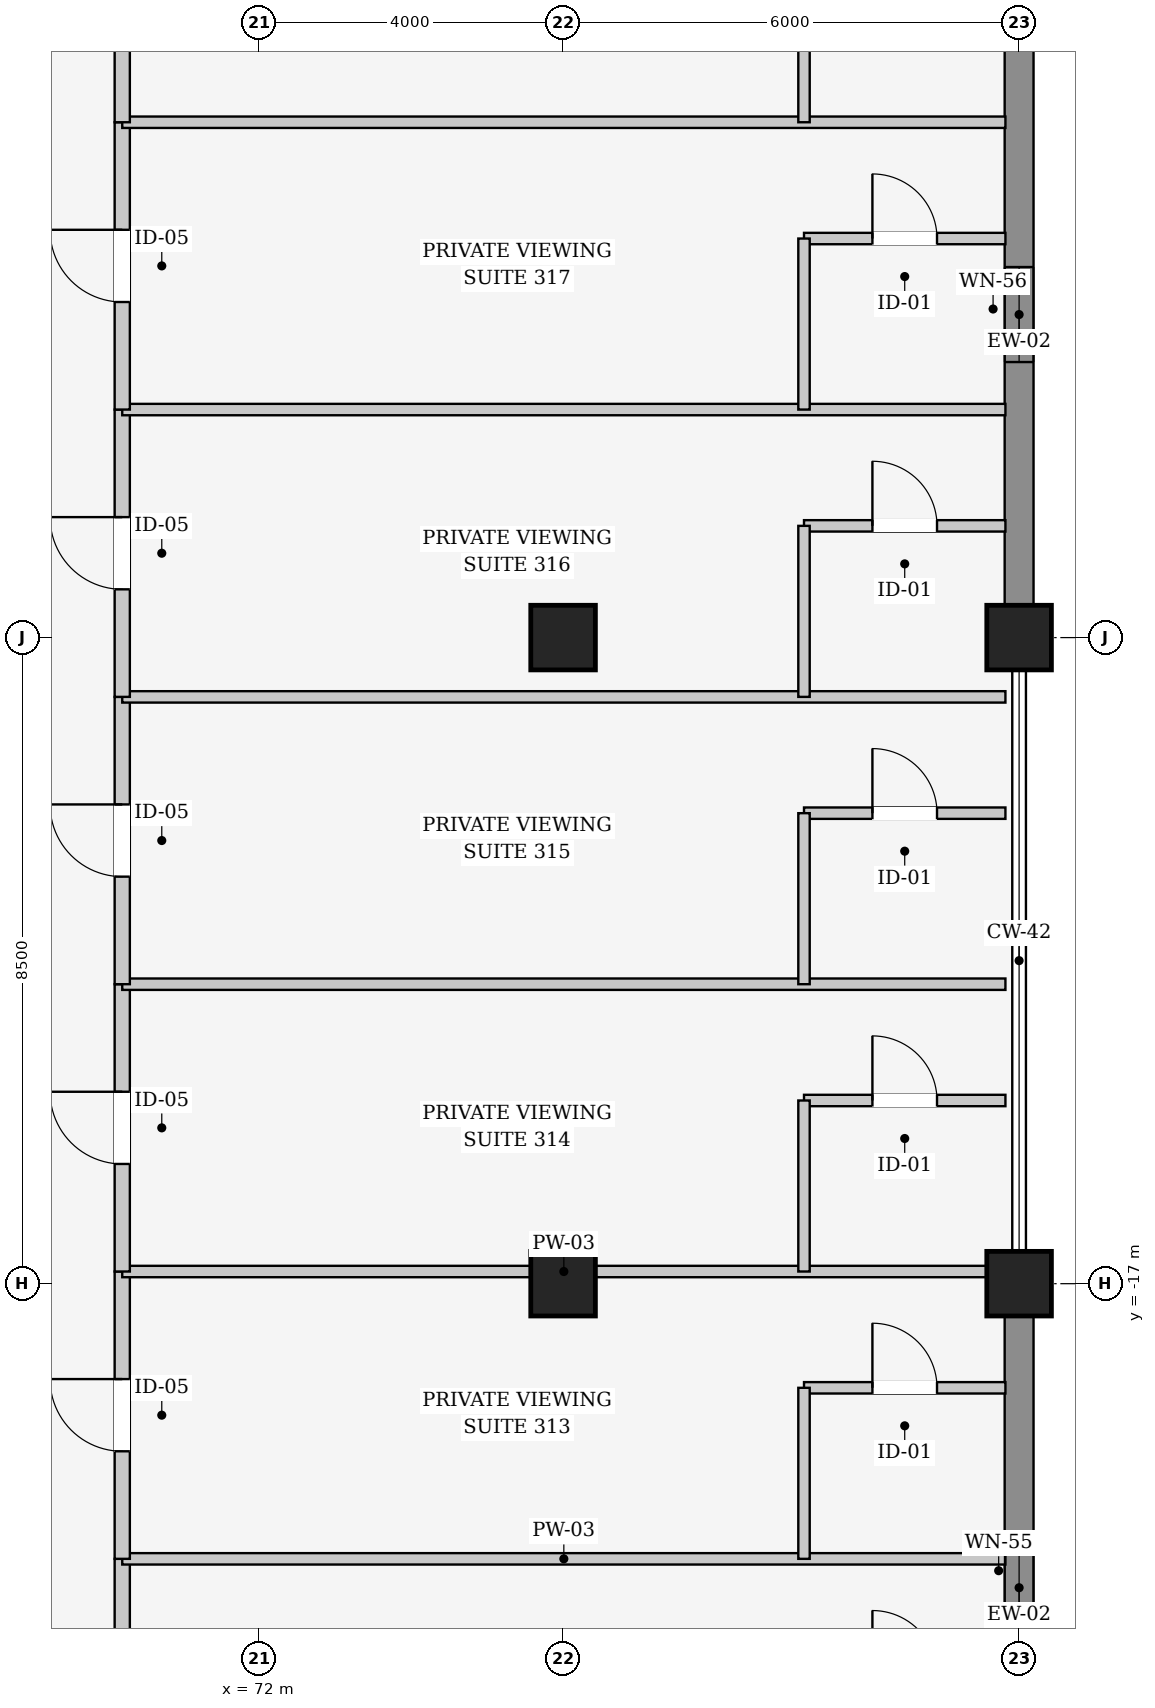
"""IFC4 building model, lengths in metres.
Left out: names, types, materials, properties, quantities, classifications, styles, units other than length and angle.
Written with IfcOpenShell. Run it as: python <this file> out.ifc"""

import sys

from ifc_helpers import new_model, si_unit, direction, frame, frame_2d, origin, origin_2d, place, context, subcontext, project, spatial, rectangle, extrude, element, fill, save


model = new_model("IFC4")
c1 = context("Model", 3, precision=1e-05, world=origin(), true_north=direction((0.0, 1.0)))
c2 = subcontext(c1, "Body", "Model", "MODEL_VIEW")
j1 = project(units=[si_unit("LENGTHUNIT", "METRE"), si_unit("PLANEANGLEUNIT", "RADIAN")], contexts=[c1])
p1 = place(None, origin())
s1 = spatial("IfcSite", under=j1, at=p1, CompositionType="ELEMENT")
p2 = place(p1, origin())
s2 = spatial("IfcBuilding", under=s1, at=p2, CompositionType="ELEMENT")
p3 = place(p2, frame((0.0, 0.0, 16.2)))
s3 = spatial("IfcBuildingStorey", under=s2, at=p3, CompositionType="ELEMENT", Elevation=16.2)
for number, where, z_axis, x_axis in (
    (1, (76.0, -17.0, 0.0), (0.0, 0.0, 1.0), (1.0, 0.0, 0.0)),
    (2, (76.0, -8.5, 0.0), (0.0, 0.0, 1.0), (1.0, 0.0, 0.0)),
    (3, (82.0, -17.0, 0.0), (0.0, 0.0, 1.0), (1.0, 0.0, 0.0)),
    (4, (82.0, -8.5, 0.0), (0.0, 0.0, 1.0), (1.0, 0.0, 0.0)),
):
    element("IfcColumn", number, at=place(p3, frame(where, z_axis=z_axis, x_axis=x_axis)), inside=s3, PredefinedType="COLUMN", context=c2, shape_type="SweptSolid", body=[
        extrude(rectangle(XDim=0.85, YDim=0.85, at=origin_2d()), origin(), (0.0, 0.0, 1.0), 4.8),
    ])
p4 = place(p3, frame((82.0, -17.407, 0.0), z_axis=(0.0, 0.0, 1.0), x_axis=(0.0, -1.0, 0.0)))
e5 = element("IfcWall", 5, at=p4, inside=s3, PredefinedType="SOLIDWALL", context=c2, shape_type="SweptSolid", body=[
    extrude(rectangle(XDim=7.186, YDim=0.38, at=frame_2d((3.593, 0.0))), origin(), (0.0, 0.0, 1.0), 3.76),
])
p5 = place(p4, frame((3.068, 0.0, 0.9)))
e6 = element("IfcOpeningElement", 6, at=p5, cuts=e5, PredefinedType="OPENING", context=c2, shape_type="SweptSolid", body=[
    extrude(rectangle(XDim=1.05, YDim=2.8, at=frame_2d((0.525, 1.4))), frame((0.0, 0.2, 0.0), z_axis=(0.0, -1.0, 0.0), x_axis=(1.0, 0.0, 0.0)), (0.0, 0.0, 1.0), 0.4),
])
p6 = place(p3, frame((82.0, -0.407, 0.0), z_axis=(0.0, 0.0, 1.0), x_axis=(0.0, -1.0, 0.0)))
e7 = element("IfcWall", 7, at=p6, inside=s3, PredefinedType="SOLIDWALL", context=c2, shape_type="SweptSolid", body=[
    extrude(rectangle(XDim=7.686, YDim=0.38, at=frame_2d((3.843, 0.0))), origin(), (0.0, 0.0, 1.0), 3.76),
])
p7 = place(p6, frame((3.218, 0.0, 0.9)))
e8 = element("IfcOpeningElement", 8, at=p7, cuts=e7, PredefinedType="OPENING", context=c2, shape_type="SweptSolid", body=[
    extrude(rectangle(XDim=1.25, YDim=2.8, at=frame_2d((0.625, 1.4))), frame((0.0, 0.2, 0.0), z_axis=(0.0, -1.0, 0.0), x_axis=(1.0, 0.0, 0.0)), (0.0, 0.0, 1.0), 0.4),
])
p8 = place(p3, frame((70.2, -24.4, 0.0), z_axis=(0.0, 0.0, 1.0), x_axis=(0.0, 1.0, 0.0)))
e9 = element("IfcWall", 9, at=p8, inside=s3, PredefinedType="PARTITIONING", context=c2, shape_type="SweptSolid", body=[
    extrude(rectangle(XDim=3.78, YDim=0.2, at=frame_2d((1.89, 0.0))), origin(), (0.0, 0.0, 1.0), 4.182),
])
p9 = place(p8, frame((1.415, 0.0, 0.0)))
e10 = element("IfcOpeningElement", 10, at=p9, cuts=e9, PredefinedType="OPENING", context=c2, shape_type="SweptSolid", body=[
    extrude(rectangle(XDim=0.95, YDim=2.25, at=frame_2d((0.475, 1.125))), frame((0.0, 0.11, 0.0), z_axis=(0.0, -1.0, 0.0), x_axis=(1.0, 0.0, 0.0)), (0.0, 0.0, 1.0), 0.22),
])
p10 = place(p3, frame((70.2, -20.62, 0.0), z_axis=(0.0, 0.0, 1.0), x_axis=(1.0, 0.0, 0.0)))
e11 = element("IfcWall", 11, at=p10, inside=s3, PredefinedType="PARTITIONING", context=c2, shape_type="SweptSolid", body=[
    extrude(rectangle(XDim=11.62, YDim=0.15, at=frame_2d((5.81, 0.0))), origin(), (0.0, 0.0, 1.0), 3.845),
])
p11 = place(p3, frame((79.17, -18.37, 0.0), z_axis=(0.0, 0.0, 1.0), x_axis=(1.0, 0.0, 0.0)))
e12 = element("IfcWall", 12, at=p11, inside=s3, PredefinedType="PARTITIONING", context=c2, shape_type="SweptSolid", body=[
    extrude(rectangle(XDim=2.65, YDim=0.15, at=frame_2d((1.325, 0.0))), origin(), (0.0, 0.0, 1.0), 3.845),
])
p12 = place(p11, frame((0.9, 0.0, 0.0)))
e13 = element("IfcOpeningElement", 13, at=p12, cuts=e12, PredefinedType="OPENING", context=c2, shape_type="SweptSolid", body=[
    extrude(rectangle(XDim=0.85, YDim=2.15, at=frame_2d((0.425, 1.075))), frame((0.0, 0.085, 0.0), z_axis=(0.0, -1.0, 0.0), x_axis=(1.0, 0.0, 0.0)), (0.0, 0.0, 1.0), 0.17),
])
p13 = place(p3, frame((79.17, -20.62, 0.0), z_axis=(0.0, 0.0, 1.0), x_axis=(0.0, 1.0, 0.0)))
e14 = element("IfcWall", 14, at=p13, inside=s3, PredefinedType="PARTITIONING", context=c2, shape_type="SweptSolid", body=[
    extrude(rectangle(XDim=2.25, YDim=0.15, at=frame_2d((1.125, 0.0))), origin(), (0.0, 0.0, 1.0), 4.44),
])
p14 = place(p3, frame((70.2, -20.62, 0.0), z_axis=(0.0, 0.0, 1.0), x_axis=(0.0, 1.0, 0.0)))
e15 = element("IfcWall", 15, at=p14, inside=s3, PredefinedType="PARTITIONING", context=c2, shape_type="SweptSolid", body=[
    extrude(rectangle(XDim=3.78, YDim=0.2, at=frame_2d((1.89, 0.0))), origin(), (0.0, 0.0, 1.0), 3.545),
])
p15 = place(p14, frame((1.415, 0.0, 0.0)))
e16 = element("IfcOpeningElement", 16, at=p15, cuts=e15, PredefinedType="OPENING", context=c2, shape_type="SweptSolid", body=[
    extrude(rectangle(XDim=0.95, YDim=2.25, at=frame_2d((0.475, 1.125))), frame((0.0, 0.11, 0.0), z_axis=(0.0, -1.0, 0.0), x_axis=(1.0, 0.0, 0.0)), (0.0, 0.0, 1.0), 0.22),
])
p16 = place(p3, frame((70.2, -16.84, 0.0), z_axis=(0.0, 0.0, 1.0), x_axis=(1.0, 0.0, 0.0)))
e17 = element("IfcWall", 17, at=p16, inside=s3, PredefinedType="PARTITIONING", context=c2, shape_type="SweptSolid", body=[
    extrude(rectangle(XDim=11.62, YDim=0.15, at=frame_2d((5.81, 0.0))), origin(), (0.0, 0.0, 1.0), 3.545),
])
p17 = place(p3, frame((79.17, -14.59, 0.0), z_axis=(0.0, 0.0, 1.0), x_axis=(1.0, 0.0, 0.0)))
e18 = element("IfcWall", 18, at=p17, inside=s3, PredefinedType="PARTITIONING", context=c2, shape_type="SweptSolid", body=[
    extrude(rectangle(XDim=2.65, YDim=0.15, at=frame_2d((1.325, 0.0))), origin(), (0.0, 0.0, 1.0), 3.845),
])
p18 = place(p17, frame((0.9, 0.0, 0.0)))
e19 = element("IfcOpeningElement", 19, at=p18, cuts=e18, PredefinedType="OPENING", context=c2, shape_type="SweptSolid", body=[
    extrude(rectangle(XDim=0.85, YDim=2.15, at=frame_2d((0.425, 1.075))), frame((0.0, 0.085, 0.0), z_axis=(0.0, -1.0, 0.0), x_axis=(1.0, 0.0, 0.0)), (0.0, 0.0, 1.0), 0.17),
])
p19 = place(p3, frame((79.17, -16.84, 0.0), z_axis=(0.0, 0.0, 1.0), x_axis=(0.0, 1.0, 0.0)))
e20 = element("IfcWall", 20, at=p19, inside=s3, PredefinedType="PARTITIONING", context=c2, shape_type="SweptSolid", body=[
    extrude(rectangle(XDim=2.25, YDim=0.15, at=frame_2d((1.125, 0.0))), origin(), (0.0, 0.0, 1.0), 3.745),
])
p20 = place(p3, frame((70.2, -16.84, 0.0), z_axis=(0.0, 0.0, 1.0), x_axis=(0.0, 1.0, 0.0)))
e21 = element("IfcWall", 21, at=p20, inside=s3, PredefinedType="PARTITIONING", context=c2, shape_type="SweptSolid", body=[
    extrude(rectangle(XDim=3.78, YDim=0.2, at=frame_2d((1.89, 0.0))), origin(), (0.0, 0.0, 1.0), 3.545),
])
p21 = place(p20, frame((1.415, 0.0, 0.0)))
e22 = element("IfcOpeningElement", 22, at=p21, cuts=e21, PredefinedType="OPENING", context=c2, shape_type="SweptSolid", body=[
    extrude(rectangle(XDim=0.95, YDim=2.25, at=frame_2d((0.475, 1.125))), frame((0.0, 0.11, 0.0), z_axis=(0.0, -1.0, 0.0), x_axis=(1.0, 0.0, 0.0)), (0.0, 0.0, 1.0), 0.22),
])
p22 = place(p3, frame((70.2, -13.06, 0.0), z_axis=(0.0, 0.0, 1.0), x_axis=(1.0, 0.0, 0.0)))
e23 = element("IfcWall", 23, at=p22, inside=s3, PredefinedType="PARTITIONING", context=c2, shape_type="SweptSolid", body=[
    extrude(rectangle(XDim=11.62, YDim=0.15, at=frame_2d((5.81, 0.0))), origin(), (0.0, 0.0, 1.0), 3.845),
])
p23 = place(p3, frame((79.17, -10.81, 0.0), z_axis=(0.0, 0.0, 1.0), x_axis=(1.0, 0.0, 0.0)))
e24 = element("IfcWall", 24, at=p23, inside=s3, PredefinedType="PARTITIONING", context=c2, shape_type="SweptSolid", body=[
    extrude(rectangle(XDim=2.65, YDim=0.15, at=frame_2d((1.325, 0.0))), origin(), (0.0, 0.0, 1.0), 3.845),
])
p24 = place(p23, frame((0.9, 0.0, 0.0)))
e25 = element("IfcOpeningElement", 25, at=p24, cuts=e24, PredefinedType="OPENING", context=c2, shape_type="SweptSolid", body=[
    extrude(rectangle(XDim=0.85, YDim=2.15, at=frame_2d((0.425, 1.075))), frame((0.0, 0.085, 0.0), z_axis=(0.0, -1.0, 0.0), x_axis=(1.0, 0.0, 0.0)), (0.0, 0.0, 1.0), 0.17),
])
p25 = place(p3, frame((79.17, -13.06, 0.0), z_axis=(0.0, 0.0, 1.0), x_axis=(0.0, 1.0, 0.0)))
e26 = element("IfcWall", 26, at=p25, inside=s3, PredefinedType="PARTITIONING", context=c2, shape_type="SweptSolid", body=[
    extrude(rectangle(XDim=2.25, YDim=0.15, at=frame_2d((1.125, 0.0))), origin(), (0.0, 0.0, 1.0), 4.182),
])
p26 = place(p3, frame((70.2, -13.06, 0.0), z_axis=(0.0, 0.0, 1.0), x_axis=(0.0, 1.0, 0.0)))
e27 = element("IfcWall", 27, at=p26, inside=s3, PredefinedType="PARTITIONING", context=c2, shape_type="SweptSolid", body=[
    extrude(rectangle(XDim=3.78, YDim=0.2, at=frame_2d((1.89, 0.0))), origin(), (0.0, 0.0, 1.0), 4.182),
])
p27 = place(p26, frame((1.415, 0.0, 0.0)))
e28 = element("IfcOpeningElement", 28, at=p27, cuts=e27, PredefinedType="OPENING", context=c2, shape_type="SweptSolid", body=[
    extrude(rectangle(XDim=0.95, YDim=2.25, at=frame_2d((0.475, 1.125))), frame((0.0, 0.11, 0.0), z_axis=(0.0, -1.0, 0.0), x_axis=(1.0, 0.0, 0.0)), (0.0, 0.0, 1.0), 0.22),
])
p28 = place(p3, frame((70.2, -9.28, 0.0), z_axis=(0.0, 0.0, 1.0), x_axis=(1.0, 0.0, 0.0)))
e29 = element("IfcWall", 29, at=p28, inside=s3, PredefinedType="PARTITIONING", context=c2, shape_type="SweptSolid", body=[
    extrude(rectangle(XDim=11.62, YDim=0.15, at=frame_2d((5.81, 0.0))), origin(), (0.0, 0.0, 1.0), 3.845),
])
p29 = place(p3, frame((79.17, -7.03, 0.0), z_axis=(0.0, 0.0, 1.0), x_axis=(1.0, 0.0, 0.0)))
e30 = element("IfcWall", 30, at=p29, inside=s3, PredefinedType="PARTITIONING", context=c2, shape_type="SweptSolid", body=[
    extrude(rectangle(XDim=2.65, YDim=0.15, at=frame_2d((1.325, 0.0))), origin(), (0.0, 0.0, 1.0), 3.845),
])
p30 = place(p29, frame((0.9, 0.0, 0.0)))
e31 = element("IfcOpeningElement", 31, at=p30, cuts=e30, PredefinedType="OPENING", context=c2, shape_type="SweptSolid", body=[
    extrude(rectangle(XDim=0.85, YDim=2.15, at=frame_2d((0.425, 1.075))), frame((0.0, 0.085, 0.0), z_axis=(0.0, -1.0, 0.0), x_axis=(1.0, 0.0, 0.0)), (0.0, 0.0, 1.0), 0.17),
])
p31 = place(p3, frame((79.17, -9.28, 0.0), z_axis=(0.0, 0.0, 1.0), x_axis=(0.0, 1.0, 0.0)))
e32 = element("IfcWall", 32, at=p31, inside=s3, PredefinedType="PARTITIONING", context=c2, shape_type="SweptSolid", body=[
    extrude(rectangle(XDim=2.25, YDim=0.15, at=frame_2d((1.125, 0.0))), origin(), (0.0, 0.0, 1.0), 3.745),
])
p32 = place(p3, frame((70.2, -9.28, 0.0), z_axis=(0.0, 0.0, 1.0), x_axis=(0.0, 1.0, 0.0)))
e33 = element("IfcWall", 33, at=p32, inside=s3, PredefinedType="PARTITIONING", context=c2, shape_type="SweptSolid", body=[
    extrude(rectangle(XDim=3.78, YDim=0.2, at=frame_2d((1.89, 0.0))), origin(), (0.0, 0.0, 1.0), 3.545),
])
p33 = place(p32, frame((1.415, 0.0, 0.0)))
e34 = element("IfcOpeningElement", 34, at=p33, cuts=e33, PredefinedType="OPENING", context=c2, shape_type="SweptSolid", body=[
    extrude(rectangle(XDim=0.95, YDim=2.25, at=frame_2d((0.475, 1.125))), frame((0.0, 0.11, 0.0), z_axis=(0.0, -1.0, 0.0), x_axis=(1.0, 0.0, 0.0)), (0.0, 0.0, 1.0), 0.22),
])
p34 = place(p3, frame((70.2, -5.5, 0.0), z_axis=(0.0, 0.0, 1.0), x_axis=(1.0, 0.0, 0.0)))
e35 = element("IfcWall", 35, at=p34, inside=s3, PredefinedType="PARTITIONING", context=c2, shape_type="SweptSolid", body=[
    extrude(rectangle(XDim=11.62, YDim=0.15, at=frame_2d((5.81, 0.0))), origin(), (0.0, 0.0, 1.0), 3.845),
])
p35 = place(p3, frame((79.17, -3.25, 0.0), z_axis=(0.0, 0.0, 1.0), x_axis=(1.0, 0.0, 0.0)))
e36 = element("IfcWall", 36, at=p35, inside=s3, PredefinedType="PARTITIONING", context=c2, shape_type="SweptSolid", body=[
    extrude(rectangle(XDim=2.65, YDim=0.15, at=frame_2d((1.325, 0.0))), origin(), (0.0, 0.0, 1.0), 3.845),
])
p36 = place(p35, frame((0.9, 0.0, 0.0)))
e37 = element("IfcOpeningElement", 37, at=p36, cuts=e36, PredefinedType="OPENING", context=c2, shape_type="SweptSolid", body=[
    extrude(rectangle(XDim=0.85, YDim=2.15, at=frame_2d((0.425, 1.075))), frame((0.0, 0.085, 0.0), z_axis=(0.0, -1.0, 0.0), x_axis=(1.0, 0.0, 0.0)), (0.0, 0.0, 1.0), 0.17),
])
p37 = place(p3, frame((79.17, -5.5, 0.0), z_axis=(0.0, 0.0, 1.0), x_axis=(0.0, 1.0, 0.0)))
e38 = element("IfcWall", 38, at=p37, inside=s3, PredefinedType="PARTITIONING", context=c2, shape_type="SweptSolid", body=[
    extrude(rectangle(XDim=2.25, YDim=0.15, at=frame_2d((1.125, 0.0))), origin(), (0.0, 0.0, 1.0), 4.182),
])
p38 = place(p3, frame((70.2, -5.5, 0.0), z_axis=(0.0, 0.0, 1.0), x_axis=(0.0, 1.0, 0.0)))
e39 = element("IfcWall", 39, at=p38, inside=s3, PredefinedType="PARTITIONING", context=c2, shape_type="SweptSolid", body=[
    extrude(rectangle(XDim=3.78, YDim=0.2, at=frame_2d((1.89, 0.0))), origin(), (0.0, 0.0, 1.0), 4.182),
])
p39 = place(p38, frame((1.415, 0.0, 0.0)))
e40 = element("IfcOpeningElement", 40, at=p39, cuts=e39, PredefinedType="OPENING", context=c2, shape_type="SweptSolid", body=[
    extrude(rectangle(XDim=0.95, YDim=2.25, at=frame_2d((0.475, 1.125))), frame((0.0, 0.11, 0.0), z_axis=(0.0, -1.0, 0.0), x_axis=(1.0, 0.0, 0.0)), (0.0, 0.0, 1.0), 0.22),
])
p40 = place(p3, frame((70.2, -1.72, 0.0), z_axis=(0.0, 0.0, 1.0), x_axis=(1.0, 0.0, 0.0)))
e41 = element("IfcWall", 41, at=p40, inside=s3, PredefinedType="PARTITIONING", context=c2, shape_type="SweptSolid", body=[
    extrude(rectangle(XDim=11.62, YDim=0.15, at=frame_2d((5.81, 0.0))), origin(), (0.0, 0.0, 1.0), 3.845),
])
p41 = place(p3, frame((79.17, -1.72, 0.0), z_axis=(0.0, 0.0, 1.0), x_axis=(0.0, 1.0, 0.0)))
e42 = element("IfcWall", 42, at=p41, inside=s3, PredefinedType="PARTITIONING", context=c2, shape_type="SweptSolid", body=[
    extrude(rectangle(XDim=2.25, YDim=0.15, at=frame_2d((1.125, 0.0))), origin(), (0.0, 0.0, 1.0), 3.745),
])
p42 = place(p3, frame((70.2, -1.72, 0.0), z_axis=(0.0, 0.0, 1.0), x_axis=(0.0, 1.0, 0.0)))
e43 = element("IfcWall", 43, at=p42, inside=s3, PredefinedType="PARTITIONING", context=c2, shape_type="SweptSolid", body=[
    extrude(rectangle(XDim=3.78, YDim=0.2, at=frame_2d((1.89, 0.0))), origin(), (0.0, 0.0, 1.0), 3.545),
])
p43 = place(p42, frame((1.415, 0.0, 0.0)))
e44 = element("IfcOpeningElement", 44, at=p43, cuts=e43, PredefinedType="OPENING", context=c2, shape_type="SweptSolid", body=[
    extrude(rectangle(XDim=0.95, YDim=2.25, at=frame_2d((0.475, 1.125))), frame((0.0, 0.11, 0.0), z_axis=(0.0, -1.0, 0.0), x_axis=(1.0, 0.0, 0.0)), (0.0, 0.0, 1.0), 0.22),
])
p44 = place(p5, origin())
e45 = element("IfcWindow", 45, at=p44, inside=s3, PartitioningType="SINGLE_PANEL", PredefinedType="WINDOW", context=c2, shape_type="SweptSolid", body=[
    extrude(rectangle(XDim=1.05, YDim=2.8, at=frame_2d((0.525, 1.4))), frame((0.0, 0.03, 0.0), z_axis=(0.0, -1.0, 0.0), x_axis=(1.0, 0.0, 0.0)), (0.0, 0.0, 1.0), 0.06),
])
fill(e6, e45)
p45 = place(p7, origin())
e46 = element("IfcWindow", 46, at=p45, inside=s3, PartitioningType="SINGLE_PANEL", PredefinedType="WINDOW", context=c2, shape_type="SweptSolid", body=[
    extrude(rectangle(XDim=1.25, YDim=2.8, at=frame_2d((0.625, 1.4))), frame((0.0, 0.03, 0.0), z_axis=(0.0, -1.0, 0.0), x_axis=(1.0, 0.0, 0.0)), (0.0, 0.0, 1.0), 0.06),
])
fill(e8, e46)
p46 = place(p12, origin())
e47 = element("IfcDoor", 47, at=p46, inside=s3, OperationType="SINGLE_SWING_LEFT", PredefinedType="DOOR", context=c2, shape_type="SweptSolid", body=[
    extrude(rectangle(XDim=0.85, YDim=2.15, at=frame_2d((0.425, 1.075))), frame((0.0, 0.025, 0.0), z_axis=(0.0, -1.0, 0.0), x_axis=(1.0, 0.0, 0.0)), (0.0, 0.0, 1.0), 0.05),
])
fill(e13, e47)
p47 = place(p15, origin())
e48 = element("IfcDoor", 48, at=p47, inside=s3, OperationType="SINGLE_SWING_RIGHT", PredefinedType="DOOR", context=c2, shape_type="SweptSolid", body=[
    extrude(rectangle(XDim=0.95, YDim=2.25, at=frame_2d((0.475, 1.125))), frame((0.0, 0.025, 0.0), z_axis=(0.0, -1.0, 0.0), x_axis=(1.0, 0.0, 0.0)), (0.0, 0.0, 1.0), 0.05),
])
fill(e16, e48)
p48 = place(p18, origin())
e49 = element("IfcDoor", 49, at=p48, inside=s3, OperationType="SINGLE_SWING_LEFT", PredefinedType="DOOR", context=c2, shape_type="SweptSolid", body=[
    extrude(rectangle(XDim=0.85, YDim=2.15, at=frame_2d((0.425, 1.075))), frame((0.0, 0.025, 0.0), z_axis=(0.0, -1.0, 0.0), x_axis=(1.0, 0.0, 0.0)), (0.0, 0.0, 1.0), 0.05),
])
fill(e19, e49)
p49 = place(p21, origin())
e50 = element("IfcDoor", 50, at=p49, inside=s3, OperationType="SINGLE_SWING_RIGHT", PredefinedType="DOOR", context=c2, shape_type="SweptSolid", body=[
    extrude(rectangle(XDim=0.95, YDim=2.25, at=frame_2d((0.475, 1.125))), frame((0.0, 0.025, 0.0), z_axis=(0.0, -1.0, 0.0), x_axis=(1.0, 0.0, 0.0)), (0.0, 0.0, 1.0), 0.05),
])
fill(e22, e50)
p50 = place(p24, origin())
e51 = element("IfcDoor", 51, at=p50, inside=s3, OperationType="SINGLE_SWING_LEFT", PredefinedType="DOOR", context=c2, shape_type="SweptSolid", body=[
    extrude(rectangle(XDim=0.85, YDim=2.15, at=frame_2d((0.425, 1.075))), frame((0.0, 0.025, 0.0), z_axis=(0.0, -1.0, 0.0), x_axis=(1.0, 0.0, 0.0)), (0.0, 0.0, 1.0), 0.05),
])
fill(e25, e51)
p51 = place(p27, origin())
e52 = element("IfcDoor", 52, at=p51, inside=s3, OperationType="SINGLE_SWING_RIGHT", PredefinedType="DOOR", context=c2, shape_type="SweptSolid", body=[
    extrude(rectangle(XDim=0.95, YDim=2.25, at=frame_2d((0.475, 1.125))), frame((0.0, 0.025, 0.0), z_axis=(0.0, -1.0, 0.0), x_axis=(1.0, 0.0, 0.0)), (0.0, 0.0, 1.0), 0.05),
])
fill(e28, e52)
p52 = place(p30, origin())
e53 = element("IfcDoor", 53, at=p52, inside=s3, OperationType="SINGLE_SWING_LEFT", PredefinedType="DOOR", context=c2, shape_type="SweptSolid", body=[
    extrude(rectangle(XDim=0.85, YDim=2.15, at=frame_2d((0.425, 1.075))), frame((0.0, 0.025, 0.0), z_axis=(0.0, -1.0, 0.0), x_axis=(1.0, 0.0, 0.0)), (0.0, 0.0, 1.0), 0.05),
])
fill(e31, e53)
p53 = place(p33, origin())
e54 = element("IfcDoor", 54, at=p53, inside=s3, OperationType="SINGLE_SWING_RIGHT", PredefinedType="DOOR", context=c2, shape_type="SweptSolid", body=[
    extrude(rectangle(XDim=0.95, YDim=2.25, at=frame_2d((0.475, 1.125))), frame((0.0, 0.025, 0.0), z_axis=(0.0, -1.0, 0.0), x_axis=(1.0, 0.0, 0.0)), (0.0, 0.0, 1.0), 0.05),
])
fill(e34, e54)
p54 = place(p36, origin())
e55 = element("IfcDoor", 55, at=p54, inside=s3, OperationType="SINGLE_SWING_LEFT", PredefinedType="DOOR", context=c2, shape_type="SweptSolid", body=[
    extrude(rectangle(XDim=0.85, YDim=2.15, at=frame_2d((0.425, 1.075))), frame((0.0, 0.025, 0.0), z_axis=(0.0, -1.0, 0.0), x_axis=(1.0, 0.0, 0.0)), (0.0, 0.0, 1.0), 0.05),
])
fill(e37, e55)
p55 = place(p39, origin())
e56 = element("IfcDoor", 56, at=p55, inside=s3, OperationType="SINGLE_SWING_RIGHT", PredefinedType="DOOR", context=c2, shape_type="SweptSolid", body=[
    extrude(rectangle(XDim=0.95, YDim=2.25, at=frame_2d((0.475, 1.125))), frame((0.0, 0.025, 0.0), z_axis=(0.0, -1.0, 0.0), x_axis=(1.0, 0.0, 0.0)), (0.0, 0.0, 1.0), 0.05),
])
fill(e40, e56)
save(model, sys.argv[1])
